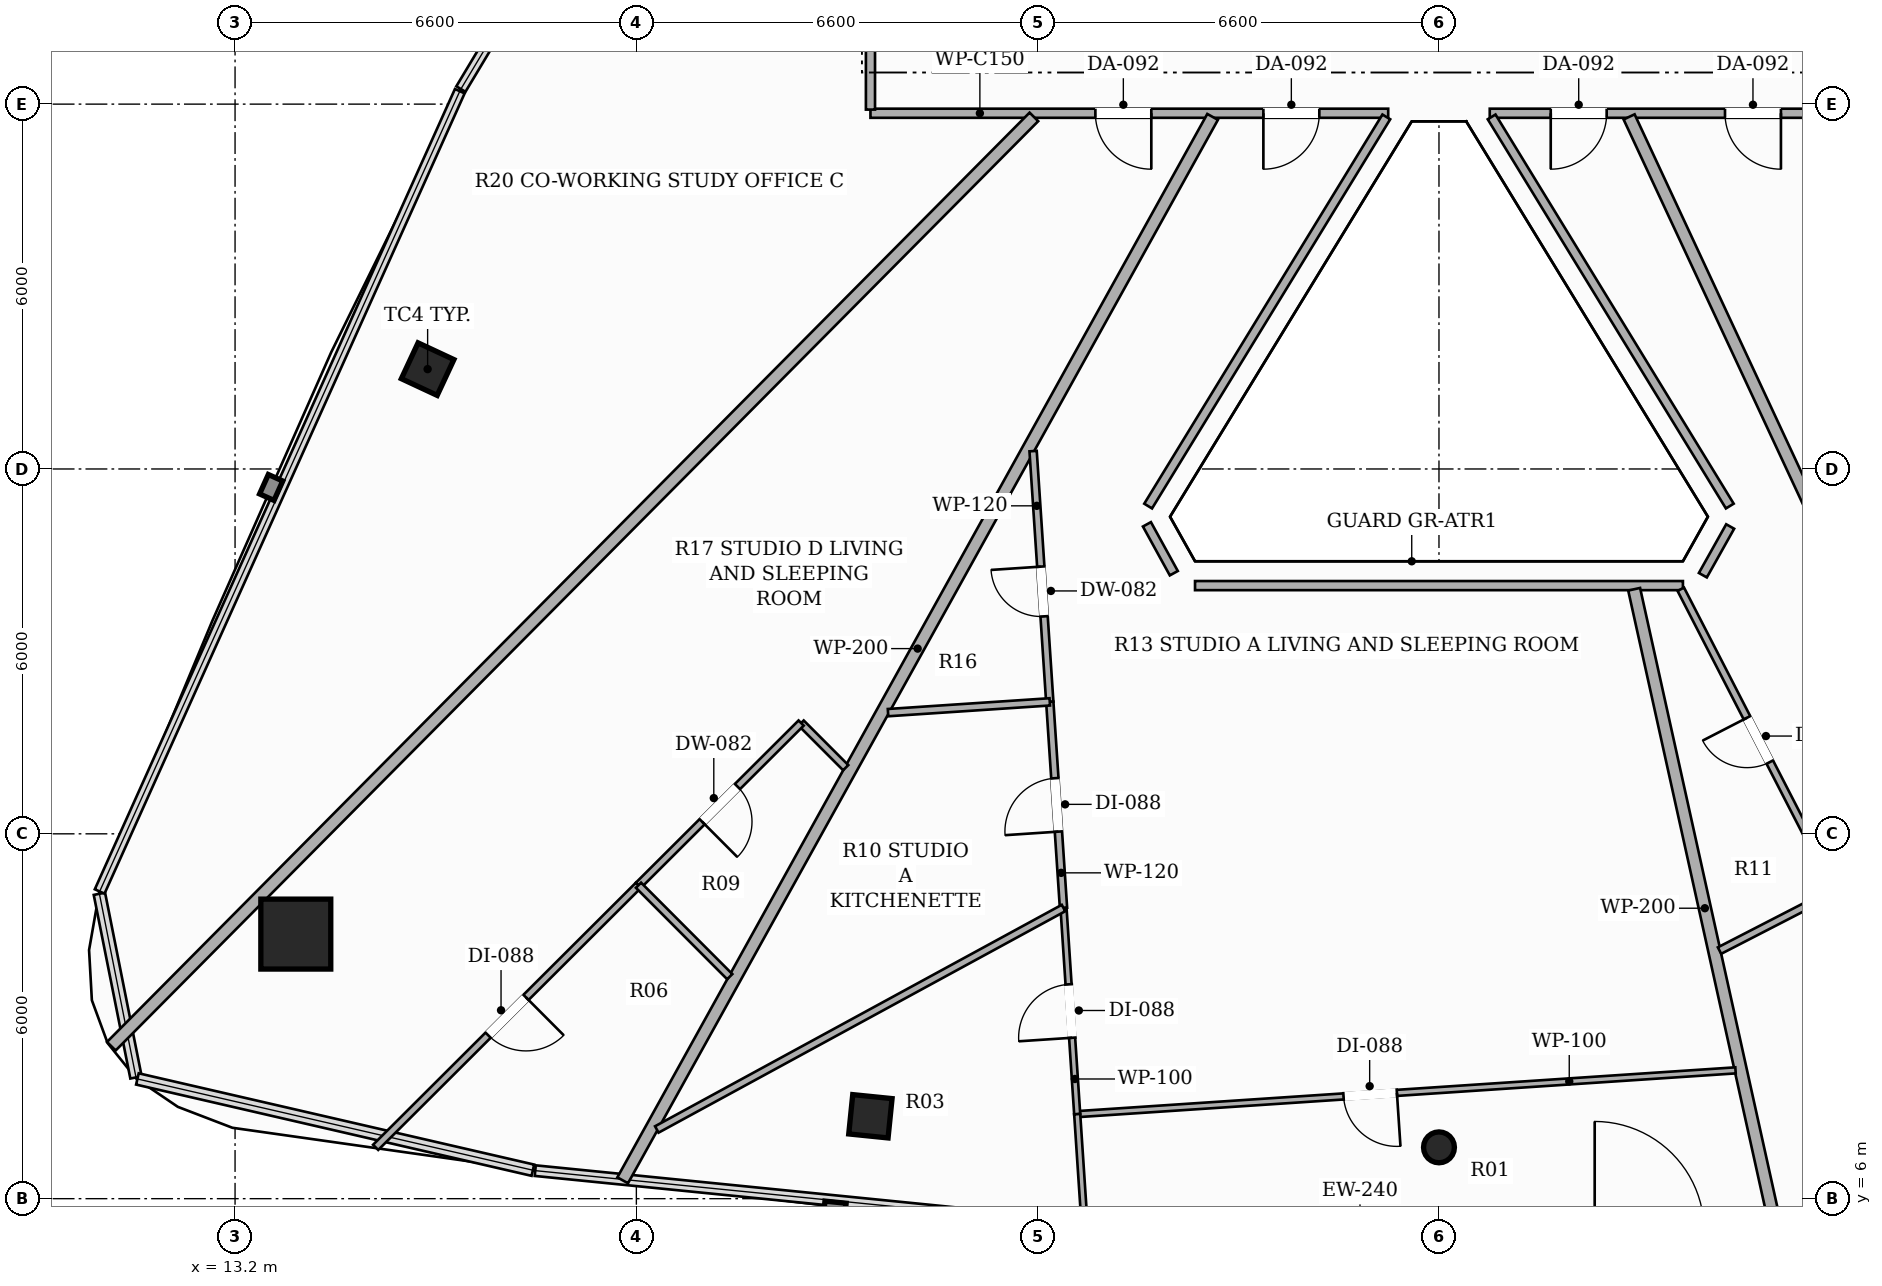
"""IFC4 building model, lengths in metres.
Left out: names, types, materials, properties, quantities, classifications, styles, units other than length and angle.
Written with IfcOpenShell. Run it as: python <this file> out.ifc"""

import sys

from ifc_helpers import new_model, si_unit, direction, frame, frame_2d, origin, origin_2d, place, context, subcontext, project, spatial, rectangle, hollow_rectangle, hollow_circle, extrude, element, fill, save


model = new_model("IFC4")
c1 = context("Model", 3, precision=1e-05, world=origin(), true_north=direction((0.0, 1.0)))
c2 = subcontext(c1, "Body", "Model", "MODEL_VIEW")
j1 = project(units=[si_unit("LENGTHUNIT", "METRE"), si_unit("PLANEANGLEUNIT", "RADIAN")], contexts=[c1])
p1 = place(None, origin())
s1 = spatial("IfcSite", under=j1, at=p1, CompositionType="ELEMENT")
p2 = place(p1, origin())
s2 = spatial("IfcBuilding", under=s1, at=p2, CompositionType="ELEMENT")
p3 = place(p2, frame((0.0, 0.0, 256.85)))
s3 = spatial("IfcBuildingStorey", under=s2, at=p3, CompositionType="ELEMENT", Elevation=256.85)
p4 = place(p3, frame((14.199, 10.351, 0.0), z_axis=(0.0, 0.0, 1.0), x_axis=(1.0, 0.0, 0.0)))
e1 = element("IfcColumn", 1, at=p4, inside=s3, PredefinedType="COLUMN", context=c2, shape_type="SweptSolid", body=[
    extrude(hollow_rectangle(XDim=1.15, YDim=1.15, WallThickness=0.036, at=origin_2d()), origin(), (0.0, 0.0, 1.0), 3.3),
])
for number, where, z_axis, x_axis in (
    (2, (16.367, 19.642, 0.0), (0.0, 0.0, 1.0), (0.423, 0.906, 0.0)),
    (3, (23.649, 7.355, 0.0), (0.0, 0.0, 1.0), (-0.995, 0.101, 0.0)),
):
    element("IfcColumn", number, at=place(p3, frame(where, z_axis=z_axis, x_axis=x_axis)), inside=s3, PredefinedType="COLUMN", context=c2, shape_type="SweptSolid", body=[
        extrude(hollow_rectangle(XDim=0.65, YDim=0.65, WallThickness=0.022, at=origin_2d()), origin(), (0.0, 0.0, 1.0), 3.3),
    ])
p5 = place(p3, frame((33.0, 6.844, 0.0), z_axis=(0.0, 0.0, 1.0), x_axis=(1.0, 0.0, 0.0)))
e4 = element("IfcColumn", 4, at=p5, inside=s3, PredefinedType="COLUMN", context=c2, shape_type="SweptSolid", body=[
    extrude(hollow_circle(Radius=0.254, WallThickness=0.016, at=origin_2d()), origin(), (0.0, 0.0, 1.0), 3.3),
])
p6 = place(p3, frame((32.165, 23.85, 0.0), z_axis=(0.0, 0.0, 1.0), x_axis=(-1.0, 0.0, 0.0)))
e5 = element("IfcWall", 5, at=p6, inside=s3, PredefinedType="PARTITIONING", context=c2, shape_type="SweptSolid", body=[
    extrude(rectangle(XDim=8.515, YDim=0.15, at=frame_2d((4.258, 0.0))), origin(), (0.0, 0.0, 1.0), 2.565),
])
p7 = place(p6, frame((1.133, 0.0, 0.0)))
e6 = element("IfcOpeningElement", 6, at=p7, cuts=e5, PredefinedType="OPENING", context=c2, shape_type="SweptSolid", body=[
    extrude(rectangle(XDim=0.92, YDim=2.15, at=frame_2d((0.46, 1.075))), frame((0.0, 0.085, 0.0), z_axis=(0.0, -1.0, 0.0), x_axis=(1.0, 0.0, 0.0)), (0.0, 0.0, 1.0), 0.17),
])
p8 = place(p6, frame((3.896, 0.0, 0.0)))
e7 = element("IfcOpeningElement", 7, at=p8, cuts=e5, PredefinedType="OPENING", context=c2, shape_type="SweptSolid", body=[
    extrude(rectangle(XDim=0.92, YDim=2.15, at=frame_2d((0.46, 1.075))), frame((0.0, 0.085, 0.0), z_axis=(0.0, -1.0, 0.0), x_axis=(1.0, 0.0, 0.0)), (0.0, 0.0, 1.0), 0.17),
])
p9 = place(p3, frame((23.65, 23.91, 0.0), z_axis=(0.0, 0.0, 1.0), x_axis=(0.0, 1.0, 0.0)))
e8 = element("IfcWall", 8, at=p9, inside=s3, PredefinedType="PARTITIONING", context=c2, shape_type="SweptSolid", body=[
    extrude(rectangle(XDim=11.059, YDim=0.15, at=frame_2d((5.53, 0.0))), origin(), (0.0, 0.0, 1.0), 2.492),
])
p10 = place(p9, frame((5.09, 0.0, 0.0)))
e9 = element("IfcOpeningElement", 9, at=p10, cuts=e8, PredefinedType="OPENING", context=c2, shape_type="SweptSolid", body=[
    extrude(rectangle(XDim=0.88, YDim=2.1, at=frame_2d((0.44, 1.05))), frame((0.0, 0.085, 0.0), z_axis=(0.0, -1.0, 0.0), x_axis=(1.0, 0.0, 0.0)), (0.0, 0.0, 1.0), 0.17),
])
p11 = place(p3, frame((42.19, 23.85, 0.0), z_axis=(0.0, 0.0, 1.0), x_axis=(-1.0, 0.0, 0.0)))
e10 = element("IfcWall", 10, at=p11, inside=s3, PredefinedType="PARTITIONING", context=c2, shape_type="SweptSolid", body=[
    extrude(rectangle(XDim=8.355, YDim=0.15, at=frame_2d((4.177, 0.0))), origin(), (0.0, 0.0, 1.0), 2.565),
])
p12 = place(p11, frame((0.2, 0.0, 0.0)))
e11 = element("IfcOpeningElement", 11, at=p12, cuts=e10, PredefinedType="OPENING", context=c2, shape_type="SweptSolid", body=[
    extrude(rectangle(XDim=0.92, YDim=2.15, at=frame_2d((0.46, 1.075))), frame((0.0, 0.085, 0.0), z_axis=(0.0, -1.0, 0.0), x_axis=(1.0, 0.0, 0.0)), (0.0, 0.0, 1.0), 0.17),
])
p13 = place(p11, frame((3.566, 0.0, 0.0)))
e12 = element("IfcOpeningElement", 12, at=p13, cuts=e10, PredefinedType="OPENING", context=c2, shape_type="SweptSolid", body=[
    extrude(rectangle(XDim=0.92, YDim=2.15, at=frame_2d((0.46, 1.075))), frame((0.0, 0.085, 0.0), z_axis=(0.0, -1.0, 0.0), x_axis=(1.0, 0.0, 0.0)), (0.0, 0.0, 1.0), 0.17),
])
p14 = place(p11, frame((6.432, 0.0, 0.0)))
e13 = element("IfcOpeningElement", 13, at=p14, cuts=e10, PredefinedType="OPENING", context=c2, shape_type="SweptSolid", body=[
    extrude(rectangle(XDim=0.92, YDim=2.15, at=frame_2d((0.46, 1.075))), frame((0.0, 0.085, 0.0), z_axis=(0.0, -1.0, 0.0), x_axis=(1.0, 0.0, 0.0)), (0.0, 0.0, 1.0), 0.17),
])
p15 = place(p3, frame((33.866, 23.79, 0.0), z_axis=(0.0, 0.0, 1.0), x_axis=(0.522011859837, -0.852938226479, 0.0)))
e14 = element("IfcWall", 14, at=p15, inside=s3, PredefinedType="PARTITIONING", context=c2, shape_type="SweptSolid", body=[
    extrude(rectangle(XDim=7.504, YDim=0.15, at=frame_2d((3.752, 0.0))), origin(), (0.0, 0.0, 1.0), 2.773),
])
p16 = place(p3, frame((37.789, 17.054, 0.0), z_axis=(0.0, 0.0, 1.0), x_axis=(-0.488935266506, -0.872320070368, 0.0)))
e15 = element("IfcWall", 15, at=p16, inside=s3, PredefinedType="PARTITIONING", context=c2, shape_type="SweptSolid", body=[
    extrude(rectangle(XDim=0.918, YDim=0.15, at=frame_2d((0.459, 0.0))), origin(), (0.0, 0.0, 1.0), 3.06),
])
p17 = place(p3, frame((37.012, 16.082, 0.0), z_axis=(0.0, 0.0, 1.0), x_axis=(-1.0, 0.0, 0.0)))
e16 = element("IfcWall", 16, at=p17, inside=s3, PredefinedType="PARTITIONING", context=c2, shape_type="SweptSolid", body=[
    extrude(rectangle(XDim=8.024, YDim=0.15, at=frame_2d((4.012, 0.0))), origin(), (0.0, 0.0, 1.0), 2.773),
])
p18 = place(p3, frame((28.639, 16.286, 0.0), z_axis=(0.0, 0.0, 1.0), x_axis=(-0.481571453054, 0.876406832244, 0.0)))
e17 = element("IfcWall", 17, at=p18, inside=s3, PredefinedType="PARTITIONING", context=c2, shape_type="SweptSolid", body=[
    extrude(rectangle(XDim=0.918, YDim=0.15, at=frame_2d((0.459, 0.0))), origin(), (0.0, 0.0, 1.0), 3.06),
])
p19 = place(p3, frame((28.217, 17.39, 0.0), z_axis=(0.0, 0.0, 1.0), x_axis=(0.522011859837, 0.852938226479, 0.0)))
e18 = element("IfcWall", 18, at=p19, inside=s3, PredefinedType="PARTITIONING", context=c2, shape_type="SweptSolid", body=[
    extrude(rectangle(XDim=7.504, YDim=0.15, at=frame_2d((3.752, 0.0))), origin(), (0.0, 0.0, 1.0), 2.773),
])
p20 = place(p3, frame((19.575, 6.302, 0.0), z_axis=(0.0, 0.0, 1.0), x_axis=(0.485129783088, 0.874442161358, 0.0)))
e19 = element("IfcWall", 19, at=p20, inside=s3, PredefinedType="PARTITIONING", context=c2, shape_type="SweptSolid", body=[
    extrude(rectangle(XDim=19.999, YDim=0.2, at=frame_2d((10.0, 0.0))), origin(), (0.0, 0.0, 1.0), 2.492),
])
p21 = place(p3, frame((36.21, 16.022, 0.0), z_axis=(0.0, 0.0, 1.0), x_axis=(0.216451711791, -0.976293325012, 0.0)))
e20 = element("IfcWall", 20, at=p21, inside=s3, PredefinedType="PARTITIONING", context=c2, shape_type="SweptSolid", body=[
    extrude(rectangle(XDim=10.746, YDim=0.2, at=frame_2d((5.373, 0.0))), origin(), (0.0, 0.0, 1.0), 2.492),
])
p22 = place(p3, frame((26.338, 23.79, 0.0), z_axis=(0.0, 0.0, 1.0), x_axis=(-0.70454576136, -0.70965855885, 0.0)))
e21 = element("IfcWall", 21, at=p22, inside=s3, PredefinedType="PARTITIONING", context=c2, shape_type="SweptSolid", body=[
    extrude(rectangle(XDim=21.536, YDim=0.2, at=frame_2d((10.768, 0.0))), origin(), (0.0, 0.0, 1.0), 2.492),
])
p23 = place(p3, frame((44.391, 6.058, 0.0), z_axis=(0.0, 0.0, 1.0), x_axis=(-0.422434507673, 0.906393450289, 0.0)))
e22 = element("IfcWall", 22, at=p23, inside=s3, PredefinedType="PARTITIONING", context=c2, shape_type="SweptSolid", body=[
    extrude(rectangle(XDim=19.563, YDim=0.2, at=frame_2d((9.782, 0.0))), origin(), (0.0, 0.0, 1.0), 2.492),
])
p24 = place(p3, frame((26.599, 14.17, 0.0), z_axis=(0.0, 0.0, 1.0), x_axis=(-0.066334744758, 0.997797425151, 0.0)))
e23 = element("IfcWall", 23, at=p24, inside=s3, PredefinedType="PARTITIONING", context=c2, shape_type="SweptSolid", body=[
    extrude(rectangle(XDim=4.133, YDim=0.12, at=frame_2d((2.066, 0.0))), origin(), (0.0, 0.0, 1.0), 2.773),
])
p25 = place(p24, frame((1.409, 0.0, 0.0)))
e24 = element("IfcOpeningElement", 24, at=p25, cuts=e23, PredefinedType="OPENING", context=c2, shape_type="SweptSolid", body=[
    extrude(rectangle(XDim=0.82, YDim=2.1, at=frame_2d((0.41, 1.05))), frame((0.0, 0.07, 0.0), z_axis=(0.0, -1.0, 0.0), x_axis=(1.0, 0.0, 0.0)), (0.0, 0.0, 1.0), 0.14),
])
p26 = place(p3, frame((26.825, 10.78, 0.0), z_axis=(0.0, 0.0, 1.0), x_axis=(-0.066471315173, 0.997788336402, 0.0)))
e25 = element("IfcWall", 25, at=p26, inside=s3, PredefinedType="PARTITIONING", context=c2, shape_type="SweptSolid", body=[
    extrude(rectangle(XDim=3.397, YDim=0.12, at=frame_2d((1.699, 0.0))), origin(), (0.0, 0.0, 1.0), 3.06),
])
p27 = place(p26, frame((1.259, 0.0, 0.0)))
e26 = element("IfcOpeningElement", 26, at=p27, cuts=e25, PredefinedType="OPENING", context=c2, shape_type="SweptSolid", body=[
    extrude(rectangle(XDim=0.88, YDim=2.1, at=frame_2d((0.44, 1.05))), frame((0.0, 0.07, 0.0), z_axis=(0.0, -1.0, 0.0), x_axis=(1.0, 0.0, 0.0)), (0.0, 0.0, 1.0), 0.14),
])
p28 = place(p3, frame((37.877, 8.11, 0.0), z_axis=(0.0, 0.0, 1.0), x_axis=(-0.997794804299, -0.066374155471, 0.0)))
e27 = element("IfcWall", 27, at=p28, inside=s3, PredefinedType="PARTITIONING", context=c2, shape_type="SweptSolid", body=[
    extrude(rectangle(XDim=10.851, YDim=0.1, at=frame_2d((5.425, 0.0))), origin(), (0.0, 0.0, 1.0), 2.492),
])
p29 = place(p28, frame((5.581, 0.0, 0.0)))
e28 = element("IfcOpeningElement", 28, at=p29, cuts=e27, PredefinedType="OPENING", context=c2, shape_type="SweptSolid", body=[
    extrude(rectangle(XDim=0.88, YDim=2.1, at=frame_2d((0.44, 1.05))), frame((0.0, 0.06, 0.0), z_axis=(0.0, -1.0, 0.0), x_axis=(1.0, 0.0, 0.0)), (0.0, 0.0, 1.0), 0.12),
])
p30 = place(p3, frame((27.05, 7.39, 0.0), z_axis=(0.0, 0.0, 1.0), x_axis=(-0.066251929929, 0.997802927326, 0.0)))
e29 = element("IfcWall", 29, at=p30, inside=s3, PredefinedType="PARTITIONING", context=c2, shape_type="SweptSolid", body=[
    extrude(rectangle(XDim=3.398, YDim=0.1, at=frame_2d((1.699, 0.0))), origin(), (0.0, 0.0, 1.0), 2.492),
])
p31 = place(p30, frame((1.259, 0.0, 0.0)))
e30 = element("IfcOpeningElement", 30, at=p31, cuts=e29, PredefinedType="OPENING", context=c2, shape_type="SweptSolid", body=[
    extrude(rectangle(XDim=0.88, YDim=2.1, at=frame_2d((0.44, 1.05))), frame((0.0, 0.06, 0.0), z_axis=(0.0, -1.0, 0.0), x_axis=(1.0, 0.0, 0.0)), (0.0, 0.0, 1.0), 0.12),
])
p32 = place(p3, frame((26.599, 14.17, 0.0), z_axis=(0.0, 0.0, 1.0), x_axis=(-0.99779365881, -0.066391373223, 0.0)))
e31 = element("IfcWall", 31, at=p32, inside=s3, PredefinedType="PARTITIONING", context=c2, shape_type="SweptSolid", body=[
    extrude(rectangle(XDim=2.666, YDim=0.12, at=frame_2d((1.333, 0.0))), origin(), (0.0, 0.0, 1.0), 2.773),
])
p33 = place(p3, frame((26.825, 10.78, 0.0), z_axis=(0.0, 0.0, 1.0), x_axis=(-0.87825059366, -0.478200684583, 0.0)))
e32 = element("IfcWall", 32, at=p33, inside=s3, PredefinedType="PARTITIONING", context=c2, shape_type="SweptSolid", body=[
    extrude(rectangle(XDim=7.616, YDim=0.12, at=frame_2d((3.808, 0.0))), origin(), (0.0, 0.0, 1.0), 2.492),
])
p34 = place(p3, frame((27.172, 5.554, 0.0), z_axis=(0.0, 0.0, 1.0), x_axis=(-0.066342877953, 0.997796884413, 0.0)))
e33 = element("IfcWall", 33, at=p34, inside=s3, PredefinedType="PARTITIONING", context=c2, shape_type="SweptSolid", body=[
    extrude(rectangle(XDim=1.84, YDim=0.1, at=frame_2d((0.92, 0.0))), origin(), (0.0, 0.0, 1.0), 2.492),
])
p35 = place(p3, frame((23.243, 13.088, 0.0), z_axis=(0.0, 0.0, 1.0), x_axis=(-0.706518163511, 0.707694909286, 0.0)))
e34 = element("IfcWall", 34, at=p35, inside=s3, PredefinedType="PARTITIONING", context=c2, shape_type="SweptSolid", body=[
    extrude(rectangle(XDim=1.037, YDim=0.12, at=frame_2d((0.519, 0.0))), origin(), (0.0, 0.0, 1.0), 3.06),
])
p36 = place(p3, frame((22.51, 13.822, 0.0), z_axis=(0.0, 0.0, 1.0), x_axis=(-0.708172404385, -0.706039549649, 0.0)))
e35 = element("IfcWall", 35, at=p36, inside=s3, PredefinedType="PARTITIONING", context=c2, shape_type="SweptSolid", body=[
    extrude(rectangle(XDim=3.777, YDim=0.12, at=frame_2d((1.889, 0.0))), origin(), (0.0, 0.0, 1.0), 2.773),
])
p37 = place(p36, frame((1.479, 0.0, 0.0)))
e36 = element("IfcOpeningElement", 36, at=p37, cuts=e35, PredefinedType="OPENING", context=c2, shape_type="SweptSolid", body=[
    extrude(rectangle(XDim=0.82, YDim=2.1, at=frame_2d((0.41, 1.05))), frame((0.0, 0.07, 0.0), z_axis=(0.0, -1.0, 0.0), x_axis=(1.0, 0.0, 0.0)), (0.0, 0.0, 1.0), 0.14),
])
p38 = place(p3, frame((19.835, 11.155, 0.0), z_axis=(0.0, 0.0, 1.0), x_axis=(-0.708085833798, -0.706126371108, 0.0)))
e37 = element("IfcWall", 37, at=p38, inside=s3, PredefinedType="PARTITIONING", context=c2, shape_type="SweptSolid", body=[
    extrude(rectangle(XDim=6.105, YDim=0.12, at=frame_2d((3.053, 0.0))), origin(), (0.0, 0.0, 1.0), 2.492),
])
p39 = place(p38, frame((2.613, 0.0, 0.0)))
e38 = element("IfcOpeningElement", 38, at=p39, cuts=e37, PredefinedType="OPENING", context=c2, shape_type="SweptSolid", body=[
    extrude(rectangle(XDim=0.88, YDim=2.1, at=frame_2d((0.44, 1.05))), frame((0.0, 0.07, 0.0), z_axis=(0.0, -1.0, 0.0), x_axis=(1.0, 0.0, 0.0)), (0.0, 0.0, 1.0), 0.14),
])
p40 = place(p3, frame((21.336, 9.651, 0.0), z_axis=(0.0, 0.0, 1.0), x_axis=(-0.70635958505, 0.707853188597, 0.0)))
e39 = element("IfcWall", 39, at=p40, inside=s3, PredefinedType="PARTITIONING", context=c2, shape_type="SweptSolid", body=[
    extrude(rectangle(XDim=2.125, YDim=0.12, at=frame_2d((1.062, 0.0))), origin(), (0.0, 0.0, 1.0), 2.773),
])
p41 = place(p3, frame((39.529, 11.066, 0.0), z_axis=(0.0, 0.0, 1.0), x_axis=(-0.457798211716, 0.889056127221, 0.0)))
e40 = element("IfcWall", 40, at=p41, inside=s3, PredefinedType="PARTITIONING", context=c2, shape_type="SweptSolid", body=[
    extrude(rectangle(XDim=5.574, YDim=0.12, at=frame_2d((2.787, 0.0))), origin(), (0.0, 0.0, 1.0), 2.773),
])
p42 = place(p41, frame((2.377, 0.0, 0.0)))
e41 = element("IfcOpeningElement", 41, at=p42, cuts=e40, PredefinedType="OPENING", context=c2, shape_type="SweptSolid", body=[
    extrude(rectangle(XDim=0.82, YDim=2.1, at=frame_2d((0.41, 1.05))), frame((0.0, 0.07, 0.0), z_axis=(0.0, -1.0, 0.0), x_axis=(1.0, 0.0, 0.0)), (0.0, 0.0, 1.0), 0.14),
])
p43 = place(p3, frame((39.529, 11.066, 0.0), z_axis=(0.0, 0.0, 1.0), x_axis=(-0.889105964634, -0.457701413207, 0.0)))
e42 = element("IfcWall", 42, at=p43, inside=s3, PredefinedType="PARTITIONING", context=c2, shape_type="SweptSolid", body=[
    extrude(rectangle(XDim=2.154, YDim=0.12, at=frame_2d((1.077, 0.0))), origin(), (0.0, 0.0, 1.0), 2.773),
])
p44 = place(p7, origin())
e43 = element("IfcDoor", 43, at=p44, inside=s3, OperationType="SINGLE_SWING_RIGHT", PredefinedType="DOOR", context=c2, shape_type="SweptSolid", body=[
    extrude(rectangle(XDim=0.92, YDim=2.15, at=frame_2d((0.46, 1.075))), frame((0.0, 0.025, 0.0), z_axis=(0.0, -1.0, 0.0), x_axis=(1.0, 0.0, 0.0)), (0.0, 0.0, 1.0), 0.05),
])
fill(e6, e43)
p45 = place(p25, origin())
e44 = element("IfcDoor", 44, at=p45, inside=s3, OperationType="SINGLE_SWING_RIGHT", PredefinedType="DOOR", context=c2, shape_type="SweptSolid", body=[
    extrude(rectangle(XDim=0.82, YDim=2.1, at=frame_2d((0.41, 1.05))), frame((0.0, 0.025, 0.0), z_axis=(0.0, -1.0, 0.0), x_axis=(1.0, 0.0, 0.0)), (0.0, 0.0, 1.0), 0.05),
])
fill(e24, e44)
p46 = place(p27, origin())
e45 = element("IfcDoor", 45, at=p46, inside=s3, OperationType="SINGLE_SWING_LEFT", PredefinedType="DOOR", context=c2, shape_type="SweptSolid", body=[
    extrude(rectangle(XDim=0.88, YDim=2.1, at=frame_2d((0.44, 1.05))), frame((0.0, 0.025, 0.0), z_axis=(0.0, -1.0, 0.0), x_axis=(1.0, 0.0, 0.0)), (0.0, 0.0, 1.0), 0.05),
])
fill(e26, e45)
p47 = place(p29, origin())
e46 = element("IfcDoor", 46, at=p47, inside=s3, OperationType="SINGLE_SWING_LEFT", PredefinedType="DOOR", context=c2, shape_type="SweptSolid", body=[
    extrude(rectangle(XDim=0.88, YDim=2.1, at=frame_2d((0.44, 1.05))), frame((0.0, 0.025, 0.0), z_axis=(0.0, -1.0, 0.0), x_axis=(1.0, 0.0, 0.0)), (0.0, 0.0, 1.0), 0.05),
])
fill(e28, e46)
p48 = place(p31, origin())
e47 = element("IfcDoor", 47, at=p48, inside=s3, OperationType="SINGLE_SWING_LEFT", PredefinedType="DOOR", context=c2, shape_type="SweptSolid", body=[
    extrude(rectangle(XDim=0.88, YDim=2.1, at=frame_2d((0.44, 1.05))), frame((0.0, 0.025, 0.0), z_axis=(0.0, -1.0, 0.0), x_axis=(1.0, 0.0, 0.0)), (0.0, 0.0, 1.0), 0.05),
])
fill(e30, e47)
p49 = place(p8, origin())
e48 = element("IfcDoor", 48, at=p49, inside=s3, OperationType="SINGLE_SWING_LEFT", PredefinedType="DOOR", context=c2, shape_type="SweptSolid", body=[
    extrude(rectangle(XDim=0.92, YDim=2.15, at=frame_2d((0.46, 1.075))), frame((0.0, 0.025, 0.0), z_axis=(0.0, -1.0, 0.0), x_axis=(1.0, 0.0, 0.0)), (0.0, 0.0, 1.0), 0.05),
])
fill(e7, e48)
p50 = place(p37, origin())
e49 = element("IfcDoor", 49, at=p50, inside=s3, OperationType="SINGLE_SWING_RIGHT", PredefinedType="DOOR", context=c2, shape_type="SweptSolid", body=[
    extrude(rectangle(XDim=0.82, YDim=2.1, at=frame_2d((0.41, 1.05))), frame((0.0, 0.025, 0.0), z_axis=(0.0, -1.0, 0.0), x_axis=(1.0, 0.0, 0.0)), (0.0, 0.0, 1.0), 0.05),
])
fill(e36, e49)
p51 = place(p39, origin())
e50 = element("IfcDoor", 50, at=p51, inside=s3, OperationType="SINGLE_SWING_LEFT", PredefinedType="DOOR", context=c2, shape_type="SweptSolid", body=[
    extrude(rectangle(XDim=0.88, YDim=2.1, at=frame_2d((0.44, 1.05))), frame((0.0, 0.025, 0.0), z_axis=(0.0, -1.0, 0.0), x_axis=(1.0, 0.0, 0.0)), (0.0, 0.0, 1.0), 0.05),
])
fill(e38, e50)
p52 = place(p13, origin())
e51 = element("IfcDoor", 51, at=p52, inside=s3, OperationType="SINGLE_SWING_LEFT", PredefinedType="DOOR", context=c2, shape_type="SweptSolid", body=[
    extrude(rectangle(XDim=0.92, YDim=2.15, at=frame_2d((0.46, 1.075))), frame((0.0, 0.025, 0.0), z_axis=(0.0, -1.0, 0.0), x_axis=(1.0, 0.0, 0.0)), (0.0, 0.0, 1.0), 0.05),
])
fill(e12, e51)
p53 = place(p14, origin())
e52 = element("IfcDoor", 52, at=p53, inside=s3, OperationType="SINGLE_SWING_RIGHT", PredefinedType="DOOR", context=c2, shape_type="SweptSolid", body=[
    extrude(rectangle(XDim=0.92, YDim=2.15, at=frame_2d((0.46, 1.075))), frame((0.0, 0.025, 0.0), z_axis=(0.0, -1.0, 0.0), x_axis=(1.0, 0.0, 0.0)), (0.0, 0.0, 1.0), 0.05),
])
fill(e13, e52)
p54 = place(p42, origin())
e53 = element("IfcDoor", 53, at=p54, inside=s3, OperationType="SINGLE_SWING_RIGHT", PredefinedType="DOOR", context=c2, shape_type="SweptSolid", body=[
    extrude(rectangle(XDim=0.82, YDim=2.1, at=frame_2d((0.41, 1.05))), frame((0.0, 0.025, 0.0), z_axis=(0.0, -1.0, 0.0), x_axis=(1.0, 0.0, 0.0)), (0.0, 0.0, 1.0), 0.05),
])
fill(e41, e53)
save(model, sys.argv[1])
